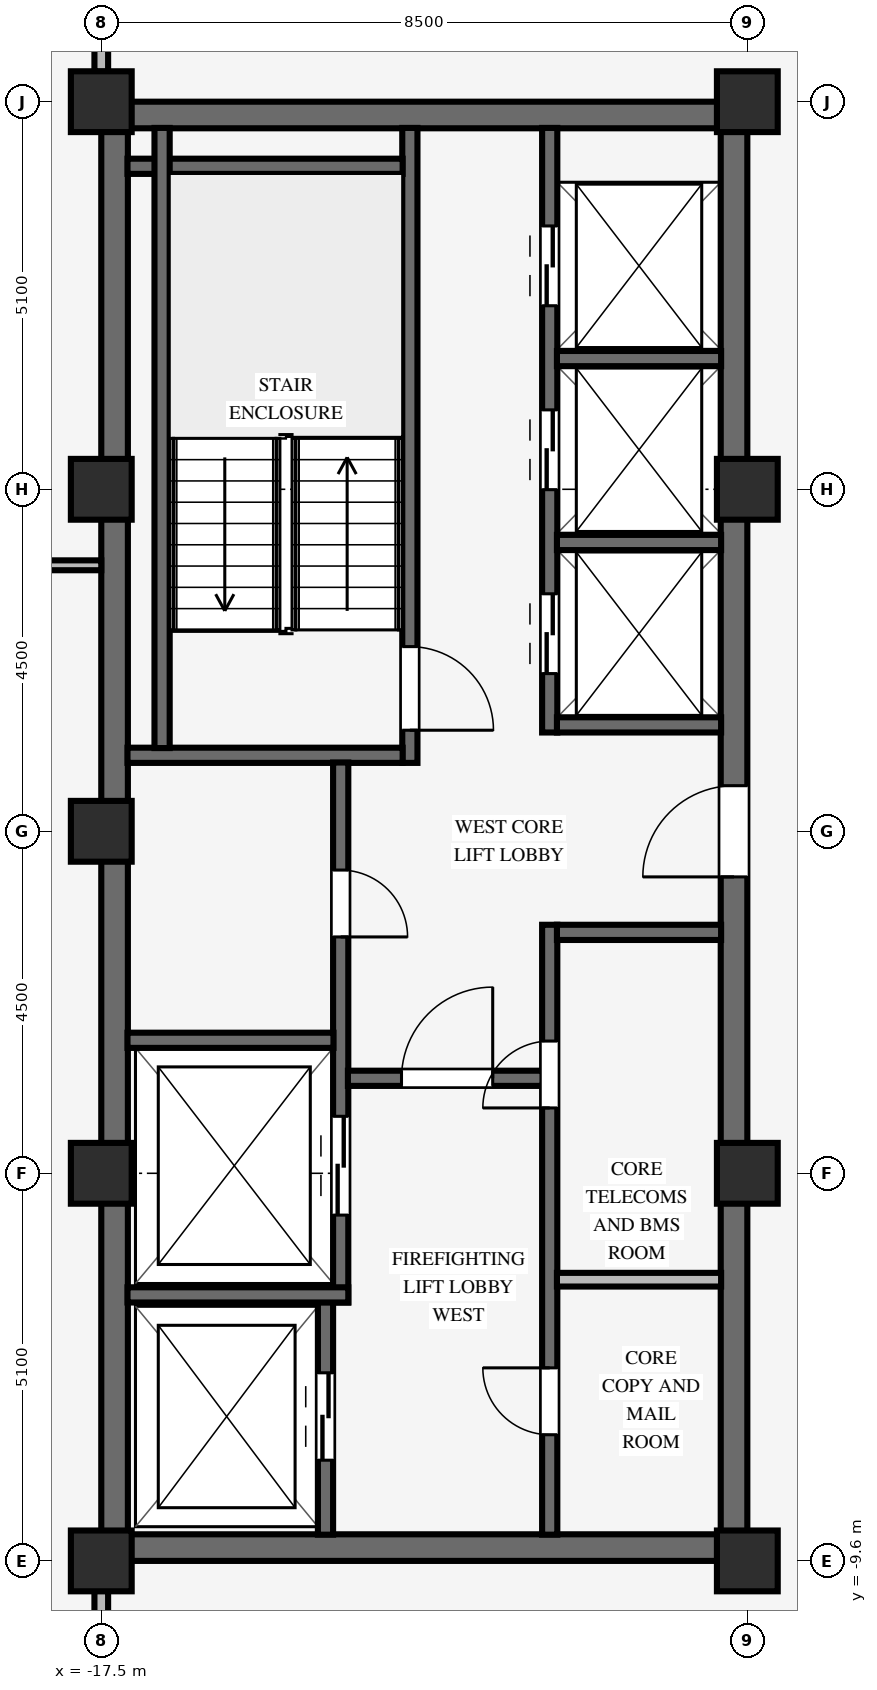
"""IFC4 building model, lengths in metres.
Left out: names, types, materials, properties, quantities, classifications, styles, units other than length and angle.
Written with IfcOpenShell. Run it as: python <this file> out.ifc"""

import sys

from ifc_helpers import new_model, si_unit, direction, frame, frame_2d, origin, origin_2d, place, context, subcontext, project, spatial, rectangle, extrude, source, transform, mapped, element, fill, save


model = new_model("IFC4")
c1 = context("Model", 3, precision=1e-05, world=origin(), true_north=direction((0.0, 1.0)))
c2 = subcontext(c1, "Body", "Model", "MODEL_VIEW")
j1 = project(units=[si_unit("LENGTHUNIT", "METRE"), si_unit("PLANEANGLEUNIT", "RADIAN")], contexts=[c1])
p1 = place(None, origin())
s1 = spatial("IfcSite", under=j1, at=p1, CompositionType="ELEMENT")
p2 = place(p1, origin())
s2 = spatial("IfcBuilding", under=s1, at=p2, CompositionType="ELEMENT")
p3 = place(p2, frame((0.0, 0.0, 261.6)))
s3 = spatial("IfcBuildingStorey", under=s2, at=p3, CompositionType="ELEMENT", Elevation=261.6)
for number, where, z_axis, x_axis in (
    (1, (-17.5, -9.425, 0.0), (0.0, 0.0, 1.0), (1.0, 0.0, 0.0)),
    (2, (-17.5, 9.425, 0.0), (0.0, 0.0, 1.0), (1.0, 0.0, 0.0)),
):
    element("IfcWall", number, at=place(p3, frame(where, z_axis=z_axis, x_axis=x_axis)), inside=s3, PredefinedType="SHEAR", context=c2, shape_type="SweptSolid", body=[
        extrude(rectangle(XDim=8.5, YDim=0.35, at=frame_2d((4.25, 0.0))), origin(), (0.0, 0.0, 1.0), 3.37),
    ])
p4 = place(p3, frame((-17.325, -9.255, 0.0), z_axis=(0.0, 0.0, 1.0), x_axis=(0.0, 1.0, 0.0)))
e3 = element("IfcWall", 3, at=p4, inside=s3, PredefinedType="SHEAR", context=c2, shape_type="SweptSolid", body=[
    extrude(rectangle(XDim=18.51, YDim=0.35, at=frame_2d((9.255, 0.0))), origin(), (0.0, 0.0, 1.0), 3.37),
])
p5 = place(p3, frame((-9.175, -9.255, 0.0), z_axis=(0.0, 0.0, 1.0), x_axis=(0.0, 1.0, 0.0)))
e4 = element("IfcWall", 4, at=p5, inside=s3, PredefinedType="SHEAR", context=c2, shape_type="SweptSolid", body=[
    extrude(rectangle(XDim=18.51, YDim=0.35, at=frame_2d((9.255, 0.0))), origin(), (0.0, 0.0, 1.0), 3.37),
])
p6 = place(p5, frame((8.655, 0.0, 0.0)))
e5 = element("IfcOpeningElement", 5, at=p6, cuts=e4, PredefinedType="OPENING", context=c2, shape_type="SweptSolid", body=[
    extrude(rectangle(XDim=1.2, YDim=2.15, at=frame_2d((0.6, 1.075))), frame((0.0, 0.185, 0.0), z_axis=(0.0, -1.0, 0.0), x_axis=(1.0, 0.0, 0.0)), (0.0, 0.0, 1.0), 0.37),
])
for number, where, z_axis, x_axis in (
    (6, (-17.5, -9.6, 0.0), (0.0, 0.0, 1.0), (1.0, 0.0, 0.0)),
    (7, (-17.5, -4.5, 0.0), (0.0, 0.0, 1.0), (1.0, 0.0, 0.0)),
    (8, (-17.5, 4.5, 0.0), (0.0, 0.0, 1.0), (1.0, 0.0, 0.0)),
    (9, (-17.5, 9.6, 0.0), (0.0, 0.0, 1.0), (1.0, 0.0, 0.0)),
    (10, (-9.0, -9.6, 0.0), (0.0, 0.0, 1.0), (1.0, 0.0, 0.0)),
    (11, (-9.0, -4.5, 0.0), (0.0, 0.0, 1.0), (1.0, 0.0, 0.0)),
    (12, (-9.0, 4.5, 0.0), (0.0, 0.0, 1.0), (1.0, 0.0, 0.0)),
    (13, (-9.0, 9.6, 0.0), (0.0, 0.0, 1.0), (1.0, 0.0, 0.0)),
    (14, (-17.5, 0.0, 0.0), (0.0, 0.0, 1.0), (1.0, 0.0, 0.0)),
):
    element("IfcColumn", number, at=place(p3, frame(where, z_axis=z_axis, x_axis=x_axis)), inside=s3, PredefinedType="COLUMN", context=c2, shape_type="SweptSolid", body=[
        extrude(rectangle(XDim=0.8, YDim=0.8, at=origin_2d()), origin(), (0.0, 0.0, 1.0), 3.37),
    ])
p7 = place(p3, frame((-13.44, 0.9, 0.0), z_axis=(0.0, 0.0, 1.0), x_axis=(0.0, 1.0, 0.0)))
e15 = element("IfcWall", 15, at=p7, inside=s3, PredefinedType="SHEAR", context=c2, shape_type="SweptSolid", body=[
    extrude(rectangle(XDim=8.355, YDim=0.2, at=frame_2d((4.177, 0.0))), origin(), (0.0, 0.0, 1.0), 3.37),
])
p8 = place(p7, frame((1.53, 0.0, 0.0), z_axis=(0.0, 0.0, 1.0), x_axis=(-1.0, 0.0, 0.0)))
e16 = element("IfcOpeningElement", 16, at=p8, cuts=e15, PredefinedType="OPENING", context=c2, shape_type="SweptSolid", body=[
    extrude(rectangle(XDim=1.1, YDim=2.15, at=frame_2d((0.55, 1.075))), frame((0.0, 0.11, 0.0), z_axis=(0.0, -1.0, 0.0), x_axis=(1.0, 0.0, 0.0)), (0.0, 0.0, 1.0), 0.22),
])
for number, where, z_axis, x_axis in (
    (17, (-17.155, 1.0, 0.0), (0.0, 0.0, 1.0), (1.0, 0.0, 0.0)),
    (18, (-17.155, 8.75, 0.0), (0.0, 0.0, 1.0), (1.0, 0.0, 0.0)),
):
    element("IfcWall", number, at=place(p3, frame(where, z_axis=z_axis, x_axis=x_axis)), inside=s3, PredefinedType="SHEAR", context=c2, shape_type="SweptSolid", body=[
        extrude(rectangle(XDim=3.62, YDim=0.2, at=frame_2d((1.81, 0.0))), origin(), (0.0, 0.0, 1.0), 3.37),
    ])
p9 = place(p3, frame((-16.7, 1.095, 0.0), z_axis=(0.0, 0.0, 1.0), x_axis=(0.0, 1.0, 0.0)))
e19 = element("IfcWall", 19, at=p9, inside=s3, PredefinedType="SHEAR", context=c2, shape_type="SweptSolid", body=[
    extrude(rectangle(XDim=8.16, YDim=0.2, at=frame_2d((4.08, 0.0))), origin(), (0.0, 0.0, 1.0), 3.37),
])
p10 = place(p3, frame((-14.55, -9.255, 0.0), z_axis=(0.0, 0.0, 1.0), x_axis=(0.0, 1.0, 0.0)))
e20 = element("IfcWall", 20, at=p10, inside=s3, PredefinedType="SHEAR", context=c2, shape_type="SweptSolid", body=[
    extrude(rectangle(XDim=3.06, YDim=0.2, at=frame_2d((1.53, 0.0))), origin(), (0.0, 0.0, 1.0), 3.37),
])
p11 = place(p10, frame((0.98, 0.0, 0.0)))
e21 = element("IfcOpeningElement", 21, at=p11, cuts=e20, PredefinedType="OPENING", context=c2, shape_type="SweptSolid", body=[
    extrude(rectangle(XDim=1.15, YDim=2.15, at=frame_2d((0.575, 1.075))), frame((0.0, 0.11, 0.0), z_axis=(0.0, -1.0, 0.0), x_axis=(1.0, 0.0, 0.0)), (0.0, 0.0, 1.0), 0.22),
])
p12 = place(p3, frame((-14.35, -6.2, 0.0), z_axis=(0.0, 0.0, 1.0), x_axis=(0.0, 1.0, 0.0)))
e22 = element("IfcWall", 22, at=p12, inside=s3, PredefinedType="SHEAR", context=c2, shape_type="SweptSolid", body=[
    extrude(rectangle(XDim=7.105, YDim=0.2, at=frame_2d((3.552, 0.0))), origin(), (0.0, 0.0, 1.0), 3.37),
])
p13 = place(p12, frame((5.69, 0.0, 0.0), z_axis=(0.0, 0.0, 1.0), x_axis=(-1.0, 0.0, 0.0)))
e23 = element("IfcOpeningElement", 23, at=p13, cuts=e22, PredefinedType="OPENING", context=c2, shape_type="SweptSolid", body=[
    extrude(rectangle(XDim=0.88, YDim=2.1, at=frame_2d((0.44, 1.05))), frame((0.0, 0.11, 0.0), z_axis=(0.0, -1.0, 0.0), x_axis=(1.0, 0.0, 0.0)), (0.0, 0.0, 1.0), 0.22),
])
p14 = place(p12, frame((1.15, 0.0, 0.0)))
e24 = element("IfcOpeningElement", 24, at=p14, cuts=e22, PredefinedType="OPENING", context=c2, shape_type="SweptSolid", body=[
    extrude(rectangle(XDim=1.3, YDim=2.2, at=frame_2d((0.65, 1.1))), frame((0.0, 0.11, 0.0), z_axis=(0.0, -1.0, 0.0), x_axis=(1.0, 0.0, 0.0)), (0.0, 0.0, 1.0), 0.22),
])
p15 = place(p3, frame((-17.155, -6.1, 0.0), z_axis=(0.0, 0.0, 1.0), x_axis=(1.0, 0.0, 0.0)))
e25 = element("IfcWall", 25, at=p15, inside=s3, PredefinedType="SHEAR", context=c2, shape_type="SweptSolid", body=[
    extrude(rectangle(XDim=2.905, YDim=0.2, at=frame_2d((1.453, 0.0))), origin(), (0.0, 0.0, 1.0), 3.37),
])
p16 = place(p3, frame((-17.155, -2.75, 0.0), z_axis=(0.0, 0.0, 1.0), x_axis=(1.0, 0.0, 0.0)))
e26 = element("IfcWall", 26, at=p16, inside=s3, PredefinedType="SHEAR", context=c2, shape_type="SweptSolid", body=[
    extrude(rectangle(XDim=2.71, YDim=0.2, at=frame_2d((1.355, 0.0))), origin(), (0.0, 0.0, 1.0), 3.37),
])
p17 = place(p3, frame((-11.6, -9.255, 0.0), z_axis=(0.0, 0.0, 1.0), x_axis=(0.0, 1.0, 0.0)))
e27 = element("IfcWall", 27, at=p17, inside=s3, PredefinedType="SHEAR", context=c2, shape_type="SweptSolid", body=[
    extrude(rectangle(XDim=8.025, YDim=0.2, at=frame_2d((4.012, 0.0))), origin(), (0.0, 0.0, 1.0), 3.37),
])
p18 = place(p17, frame((1.315, 0.0, 0.0)))
e28 = element("IfcOpeningElement", 28, at=p18, cuts=e27, PredefinedType="OPENING", context=c2, shape_type="SweptSolid", body=[
    extrude(rectangle(XDim=0.88, YDim=2.1, at=frame_2d((0.44, 1.05))), frame((0.0, 0.11, 0.0), z_axis=(0.0, -1.0, 0.0), x_axis=(1.0, 0.0, 0.0)), (0.0, 0.0, 1.0), 0.22),
])
p19 = place(p17, frame((5.615, 0.0, 0.0)))
e29 = element("IfcOpeningElement", 29, at=p19, cuts=e27, PredefinedType="OPENING", context=c2, shape_type="SweptSolid", body=[
    extrude(rectangle(XDim=0.88, YDim=2.1, at=frame_2d((0.44, 1.05))), frame((0.0, 0.11, 0.0), z_axis=(0.0, -1.0, 0.0), x_axis=(1.0, 0.0, 0.0)), (0.0, 0.0, 1.0), 0.22),
])
p20 = place(p3, frame((-14.255, -3.25, 0.0), z_axis=(0.0, 0.0, 1.0), x_axis=(1.0, 0.0, 0.0)))
e30 = element("IfcWall", 30, at=p20, inside=s3, PredefinedType="SHEAR", context=c2, shape_type="SweptSolid", body=[
    extrude(rectangle(XDim=2.56, YDim=0.2, at=frame_2d((1.28, 0.0))), origin(), (0.0, 0.0, 1.0), 3.37),
])
p21 = place(p20, frame((0.705, 0.0, 0.0)))
e31 = element("IfcOpeningElement", 31, at=p21, cuts=e30, PredefinedType="OPENING", context=c2, shape_type="SweptSolid", body=[
    extrude(rectangle(XDim=1.2, YDim=2.15, at=frame_2d((0.6, 1.075))), frame((0.0, 0.11, 0.0), z_axis=(0.0, -1.0, 0.0), x_axis=(1.0, 0.0, 0.0)), (0.0, 0.0, 1.0), 0.22),
])
p22 = place(p3, frame((-11.505, -1.33, 0.0), z_axis=(0.0, 0.0, 1.0), x_axis=(1.0, 0.0, 0.0)))
e32 = element("IfcWall", 32, at=p22, inside=s3, PredefinedType="SHEAR", context=c2, shape_type="SweptSolid", body=[
    extrude(rectangle(XDim=2.16, YDim=0.2, at=frame_2d((1.08, 0.0))), origin(), (0.0, 0.0, 1.0), 3.37),
])
p23 = place(p3, frame((-11.505, -5.9, 0.0), z_axis=(0.0, 0.0, 1.0), x_axis=(1.0, 0.0, 0.0)))
e33 = element("IfcWall", 33, at=p23, inside=s3, PredefinedType="PARTITIONING", context=c2, shape_type="SweptSolid", body=[
    extrude(rectangle(XDim=2.16, YDim=0.18, at=frame_2d((1.08, 0.0))), origin(), (0.0, 0.0, 1.0), 3.36),
])
p24 = place(p3, frame((-11.6, 1.3, 0.0), z_axis=(0.0, 0.0, 1.0), x_axis=(0.0, 1.0, 0.0)))
e34 = element("IfcWall", 34, at=p24, inside=s3, PredefinedType="SHEAR", context=c2, shape_type="SweptSolid", body=[
    extrude(rectangle(XDim=7.955, YDim=0.2, at=frame_2d((3.978, 0.0))), origin(), (0.0, 0.0, 1.0), 3.37),
])
p25 = place(p24, frame((0.775, 0.0, 0.0)))
e35 = element("IfcOpeningElement", 35, at=p25, cuts=e34, PredefinedType="OPENING", context=c2, shape_type="SweptSolid", body=[
    extrude(rectangle(XDim=1.05, YDim=2.15, at=frame_2d((0.525, 1.075))), frame((0.0, 0.11, 0.0), z_axis=(0.0, -1.0, 0.0), x_axis=(1.0, 0.0, 0.0)), (0.0, 0.0, 1.0), 0.22),
])
p26 = place(p24, frame((3.195, 0.0, 0.0)))
e36 = element("IfcOpeningElement", 36, at=p26, cuts=e34, PredefinedType="OPENING", context=c2, shape_type="SweptSolid", body=[
    extrude(rectangle(XDim=1.05, YDim=2.15, at=frame_2d((0.525, 1.075))), frame((0.0, 0.11, 0.0), z_axis=(0.0, -1.0, 0.0), x_axis=(1.0, 0.0, 0.0)), (0.0, 0.0, 1.0), 0.22),
])
p27 = place(p24, frame((5.615, 0.0, 0.0)))
e37 = element("IfcOpeningElement", 37, at=p27, cuts=e34, PredefinedType="OPENING", context=c2, shape_type="SweptSolid", body=[
    extrude(rectangle(XDim=1.05, YDim=2.15, at=frame_2d((0.525, 1.075))), frame((0.0, 0.11, 0.0), z_axis=(0.0, -1.0, 0.0), x_axis=(1.0, 0.0, 0.0)), (0.0, 0.0, 1.0), 0.22),
])
for number, where, z_axis, x_axis in (
    (38, (-11.505, 1.4, 0.0), (0.0, 0.0, 1.0), (1.0, 0.0, 0.0)),
    (39, (-11.505, 3.8, 0.0), (0.0, 0.0, 1.0), (1.0, 0.0, 0.0)),
    (40, (-11.505, 6.22, 0.0), (0.0, 0.0, 1.0), (1.0, 0.0, 0.0)),
):
    element("IfcWall", number, at=place(p3, frame(where, z_axis=z_axis, x_axis=x_axis)), inside=s3, PredefinedType="SHEAR", context=c2, shape_type="SweptSolid", body=[
        extrude(rectangle(XDim=2.16, YDim=0.2, at=frame_2d((1.08, 0.0))), origin(), (0.0, 0.0, 1.0), 3.37),
    ])
p28 = place(p3, frame((-20.7, 3.5, 0.0), z_axis=(0.0, 0.0, 1.0), x_axis=(1.0, 0.0, 0.0)))
e41 = element("IfcWall", 41, at=p28, inside=s3, PredefinedType="PARTITIONING", context=c2, shape_type="SweptSolid", body=[
    extrude(rectangle(XDim=3.2, YDim=0.13, at=frame_2d((1.6, 0.0))), origin(), (0.0, 0.0, 1.0), 3.36),
])
for number, where, z_axis, x_axis in (
    (42, (-17.5, -11.114, 0.0), (0.0, 0.0, 1.0), (0.0, 1.0, 0.0)),
    (43, (-17.5, 9.996, 0.0), (0.0, 0.0, 1.0), (0.0, 1.0, 0.0)),
):
    element("IfcWall", number, at=place(p3, frame(where, z_axis=z_axis, x_axis=x_axis)), inside=s3, PredefinedType="PARTITIONING", context=c2, shape_type="SweptSolid", body=[
        extrude(rectangle(XDim=1.118, YDim=0.18, at=frame_2d((0.559, 0.0))), origin(), (0.0, 0.0, 1.0), 2.892),
    ])
m1 = source(origin(), c2, "Body", "SweptSolid", [
    extrude(rectangle(XDim=1.1, YDim=2.15, at=frame_2d((0.55, 1.075))), frame((0.0, 0.025, 0.0), z_axis=(0.0, -1.0, 0.0), x_axis=(1.0, 0.0, 0.0)), (0.0, 0.0, 1.0), 0.05),
])
p29 = place(p8, origin())
e44 = element("IfcDoor", 44, at=p29, inside=s3, OperationType="SINGLE_SWING_RIGHT", PredefinedType="DOOR", context=c2, shape_type="MappedRepresentation", body=[
    mapped(m1, transform((0.0, 0.0, 0.0), scale=1.0)),
])
fill(e16, e44)
m2 = source(origin(), c2, "Body", "SweptSolid", [
    extrude(rectangle(XDim=0.88, YDim=2.1, at=frame_2d((0.44, 1.05))), frame((0.0, 0.025, 0.0), z_axis=(0.0, -1.0, 0.0), x_axis=(1.0, 0.0, 0.0)), (0.0, 0.0, 1.0), 0.05),
])
p30 = place(p13, origin())
e45 = element("IfcDoor", 45, at=p30, inside=s3, OperationType="SINGLE_SWING_RIGHT", PredefinedType="DOOR", context=c2, shape_type="MappedRepresentation", body=[
    mapped(m2, transform((0.0, 0.0, 0.0), scale=1.0)),
])
fill(e23, e45)
m3 = source(origin(), c2, "Body", "SweptSolid", [
    extrude(rectangle(XDim=1.2, YDim=2.15, at=frame_2d((0.6, 1.075))), frame((0.0, 0.025, 0.0), z_axis=(0.0, -1.0, 0.0), x_axis=(1.0, 0.0, 0.0)), (0.0, 0.0, 1.0), 0.05),
])
p31 = place(p21, origin())
e46 = element("IfcDoor", 46, at=p31, inside=s3, OperationType="SINGLE_SWING_RIGHT", PredefinedType="DOOR", context=c2, shape_type="MappedRepresentation", body=[
    mapped(m3, transform((0.0, 0.0, 0.0), scale=1.0)),
])
fill(e31, e46)
p32 = place(p18, origin())
e47 = element("IfcDoor", 47, at=p32, inside=s3, OperationType="SINGLE_SWING_RIGHT", PredefinedType="DOOR", context=c2, shape_type="MappedRepresentation", body=[
    mapped(m2, transform((0.0, 0.0, 0.0), scale=1.0)),
])
fill(e28, e47)
p33 = place(p19, origin())
e48 = element("IfcDoor", 48, at=p33, inside=s3, OperationType="SINGLE_SWING_LEFT", PredefinedType="DOOR", context=c2, shape_type="MappedRepresentation", body=[
    mapped(m2, transform((0.0, 0.0, 0.0), scale=1.0)),
])
fill(e29, e48)
p34 = place(p6, origin())
e49 = element("IfcDoor", 49, at=p34, inside=s3, OperationType="SINGLE_SWING_LEFT", PredefinedType="DOOR", context=c2, shape_type="MappedRepresentation", body=[
    mapped(m3, transform((0.0, 0.0, 0.0), scale=1.0)),
])
fill(e5, e49)
m4 = source(origin(), c2, "Body", "SweptSolid", [
    extrude(rectangle(XDim=1.15, YDim=2.15, at=frame_2d((0.575, 1.075))), frame((0.0, 0.025, 0.0), z_axis=(0.0, -1.0, 0.0), x_axis=(1.0, 0.0, 0.0)), (0.0, 0.0, 1.0), 0.05),
])
p35 = place(p11, origin())
e50 = element("IfcDoor", 50, at=p35, inside=s3, OperationType="DOUBLE_DOOR_SLIDING", PredefinedType="DOOR", context=c2, shape_type="MappedRepresentation", body=[
    mapped(m4, transform((0.0, 0.0, 0.0), scale=1.0)),
])
fill(e21, e50)
m5 = source(origin(), c2, "Body", "SweptSolid", [
    extrude(rectangle(XDim=1.3, YDim=2.2, at=frame_2d((0.65, 1.1))), frame((0.0, 0.025, 0.0), z_axis=(0.0, -1.0, 0.0), x_axis=(1.0, 0.0, 0.0)), (0.0, 0.0, 1.0), 0.05),
])
p36 = place(p14, origin())
e51 = element("IfcDoor", 51, at=p36, inside=s3, OperationType="DOUBLE_DOOR_SLIDING", PredefinedType="DOOR", context=c2, shape_type="MappedRepresentation", body=[
    mapped(m5, transform((0.0, 0.0, 0.0), scale=1.0)),
])
fill(e24, e51)
m6 = source(origin(), c2, "Body", "SweptSolid", [
    extrude(rectangle(XDim=1.05, YDim=2.15, at=frame_2d((0.525, 1.075))), frame((0.0, 0.025, 0.0), z_axis=(0.0, -1.0, 0.0), x_axis=(1.0, 0.0, 0.0)), (0.0, 0.0, 1.0), 0.05),
])
p37 = place(p25, origin())
e52 = element("IfcDoor", 52, at=p37, inside=s3, OperationType="DOUBLE_DOOR_SLIDING", PredefinedType="DOOR", context=c2, shape_type="MappedRepresentation", body=[
    mapped(m6, transform((0.0, 0.0, 0.0), scale=1.0)),
])
fill(e35, e52)
p38 = place(p26, origin())
e53 = element("IfcDoor", 53, at=p38, inside=s3, OperationType="DOUBLE_DOOR_SLIDING", PredefinedType="DOOR", context=c2, shape_type="MappedRepresentation", body=[
    mapped(m6, transform((0.0, 0.0, 0.0), scale=1.0)),
])
fill(e36, e53)
p39 = place(p27, origin())
e54 = element("IfcDoor", 54, at=p39, inside=s3, OperationType="DOUBLE_DOOR_SLIDING", PredefinedType="DOOR", context=c2, shape_type="MappedRepresentation", body=[
    mapped(m6, transform((0.0, 0.0, 0.0), scale=1.0)),
])
fill(e37, e54)
save(model, sys.argv[1])
